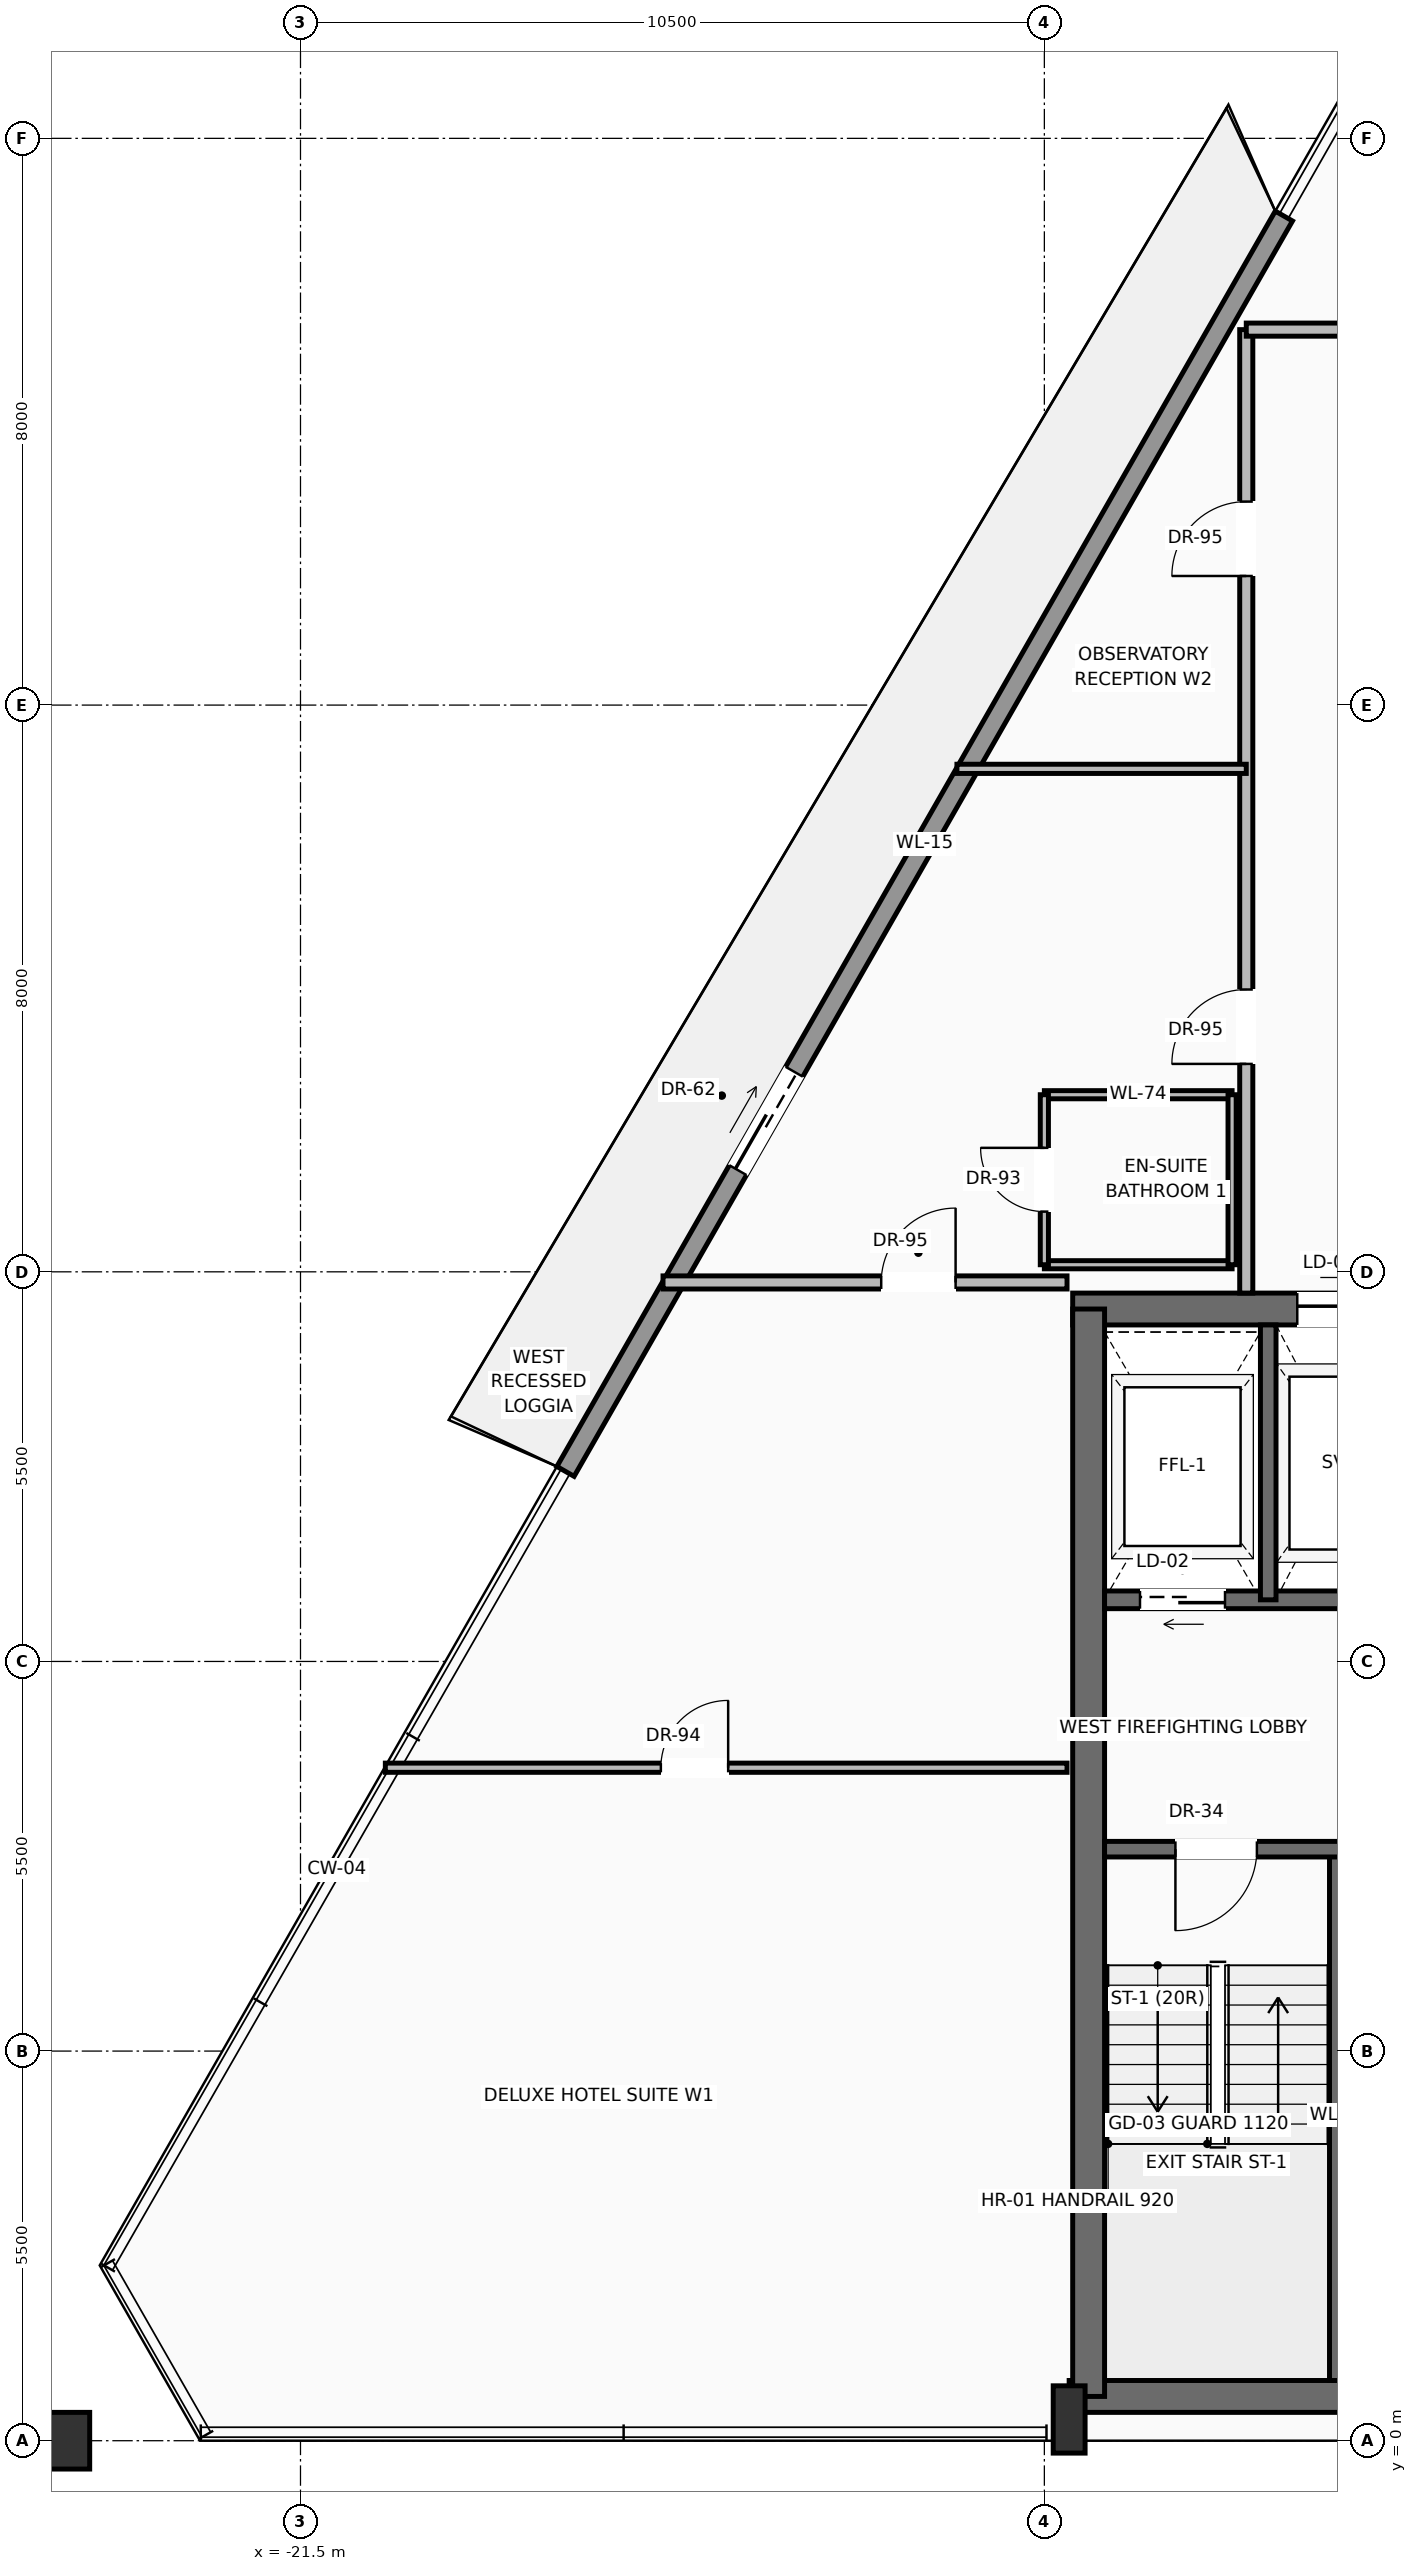
"""IFC4 building model, lengths in metres.
Left out: names, types, materials, properties, quantities, classifications, styles, units other than length and angle.
Written with IfcOpenShell. Run it as: python <this file> out.ifc"""

import sys

from ifc_helpers import new_model, si_unit, direction, frame, frame_2d, origin, origin_2d, place, context, subcontext, project, spatial, rectangle, hollow_rectangle, extrude, source, transform, mapped, element, fill, save


model = new_model("IFC4")
c1 = context("Model", 3, precision=1e-05, world=origin(), true_north=direction((0.0, 1.0)))
c2 = subcontext(c1, "Body", "Model", "MODEL_VIEW")
j1 = project(units=[si_unit("LENGTHUNIT", "METRE"), si_unit("PLANEANGLEUNIT", "RADIAN")], contexts=[c1])
p1 = place(None, origin())
s1 = spatial("IfcSite", under=j1, at=p1, CompositionType="ELEMENT")
p2 = place(p1, origin())
s2 = spatial("IfcBuilding", under=s1, at=p2, CompositionType="ELEMENT")
p3 = place(p2, frame((0.0, 0.0, 300.6)))
s3 = spatial("IfcBuildingStorey", under=s2, at=p3, CompositionType="ELEMENT", Elevation=300.6)
p4 = place(p3, frame((-10.65, 0.625, 0.0), z_axis=(0.0, 0.0, 1.0), x_axis=(1.0, 0.0, 0.0)))
e1 = element("IfcWall", 1, at=p4, inside=s3, PredefinedType="SHEAR", context=c2, shape_type="SweptSolid", body=[
    extrude(rectangle(XDim=21.3, YDim=0.45, at=frame_2d((10.65, 0.0))), origin(), (0.0, 0.0, 1.0), 3.15),
])
p5 = place(p3, frame((-10.6, 15.975, 0.0), z_axis=(0.0, 0.0, 1.0), x_axis=(1.0, 0.0, 0.0)))
e2 = element("IfcWall", 2, at=p5, inside=s3, PredefinedType="SHEAR", context=c2, shape_type="SweptSolid", body=[
    extrude(rectangle(XDim=21.2, YDim=0.45, at=frame_2d((10.6, 0.0))), origin(), (0.0, 0.0, 1.0), 3.15),
])
p6 = place(p5, frame((3.17, 0.0, 0.0)))
e3 = element("IfcOpeningElement", 3, at=p6, cuts=e2, PredefinedType="OPENING", context=c2, shape_type="SweptSolid", body=[
    extrude(rectangle(XDim=1.3, YDim=2.3, at=frame_2d((0.65, 1.15))), frame((0.0, 0.235, 0.0), z_axis=(0.0, -1.0, 0.0), x_axis=(1.0, 0.0, 0.0)), (0.0, 0.0, 1.0), 0.47),
])
p7 = place(p5, frame((9.6, 0.0, 0.0)))
e4 = element("IfcOpeningElement", 4, at=p7, cuts=e2, PredefinedType="OPENING", context=c2, shape_type="SweptSolid", body=[
    extrude(rectangle(XDim=2.0, YDim=2.4, at=frame_2d((1.0, 1.2))), frame((0.0, 0.235, 0.0), z_axis=(0.0, -1.0, 0.0), x_axis=(1.0, 0.0, 0.0)), (0.0, 0.0, 1.0), 0.47),
])
p8 = place(p3, frame((-10.375, 0.625, 0.0), z_axis=(0.0, 0.0, 1.0), x_axis=(0.0, 1.0, 0.0)))
e5 = element("IfcWall", 5, at=p8, inside=s3, PredefinedType="SHEAR", context=c2, shape_type="SweptSolid", body=[
    extrude(rectangle(XDim=15.35, YDim=0.45, at=frame_2d((7.675, 0.0))), origin(), (0.0, 0.0, 1.0), 3.15),
])
m1 = source(origin(), c2, "Body", "SweptSolid", [
    extrude(rectangle(XDim=0.45, YDim=0.95, at=origin_2d()), origin(), (0.0, 0.0, 1.0), 3.45),
])
p9 = place(p3, frame((-10.65, 0.3, 0.0), z_axis=(0.0, 0.0, 1.0), x_axis=(1.0, 0.0, 0.0)))
e6 = element("IfcColumn", 6, at=p9, inside=s3, PredefinedType="PILASTER", context=c2, shape_type="MappedRepresentation", body=[
    mapped(m1, transform((0.0, 0.0, 0.0), scale=1.0)),
])
m2 = source(origin(), c2, "Body", "SweptSolid", [
    extrude(hollow_rectangle(XDim=0.8, YDim=0.8, WallThickness=0.04, at=origin_2d()), origin(), (0.0, 0.0, 1.0), 3.441),
])
p10 = place(p3, frame((-24.875, 0.0, 0.004), z_axis=(0.002908820613, 0.0, 0.999995769372), x_axis=(0.0, 1.0, 0.0)))
e7 = element("IfcColumn", 7, at=p10, inside=s3, PredefinedType="COLUMN", context=c2, shape_type="MappedRepresentation", body=[
    mapped(m2, transform((0.0, 0.0, 0.0), scale=1.0)),
])
p11 = place(p3, frame((-17.759, 13.683, 0.0), z_axis=(0.0, 0.0, 1.0), x_axis=(0.496660385715, 0.867944964419, 0.0)))
e8 = element("IfcWall", 8, at=p11, inside=s3, PredefinedType="SOLIDWALL", context=c2, shape_type="SweptSolid", body=[
    extrude(rectangle(XDim=20.417, YDim=0.28, at=frame_2d((10.208, 0.0))), origin(), (0.0, 0.0, 1.0), 2.73),
])
p12 = place(p11, frame((4.9, 0.0, 0.0)))
e9 = element("IfcOpeningElement", 9, at=p12, cuts=e8, PredefinedType="OPENING", context=c2, shape_type="SweptSolid", body=[
    extrude(rectangle(XDim=1.6, YDim=2.35, at=frame_2d((0.8, 1.175))), frame((0.0, 0.15, 0.0), z_axis=(0.0, -1.0, 0.0), x_axis=(1.0, 0.0, 0.0)), (0.0, 0.0, 1.0), 0.3),
])
p13 = place(p3, frame((-6.85, 0.85, 0.0), z_axis=(0.0, 0.0, 1.0), x_axis=(0.0, 1.0, 0.0)))
e10 = element("IfcWall", 10, at=p13, inside=s3, PredefinedType="SOLIDWALL", context=c2, shape_type="SweptSolid", body=[
    extrude(rectangle(XDim=7.5, YDim=0.25, at=frame_2d((3.75, 0.0))), origin(), (0.0, 0.0, 1.0), 3.15),
])
p14 = place(p3, frame((-5.5, 8.35, 0.0), z_axis=(0.0, 0.0, 1.0), x_axis=(-1.0, 0.0, 0.0)))
e11 = element("IfcWall", 11, at=p14, inside=s3, PredefinedType="SOLIDWALL", context=c2, shape_type="SweptSolid", body=[
    extrude(rectangle(XDim=4.65, YDim=0.22, at=frame_2d((2.325, 0.0))), origin(), (0.0, 0.0, 1.0), 3.15),
])
p15 = place(p14, frame((2.5, 0.0, 0.0)))
e12 = element("IfcOpeningElement", 12, at=p15, cuts=e11, PredefinedType="OPENING", context=c2, shape_type="SweptSolid", body=[
    extrude(rectangle(XDim=1.15, YDim=2.2, at=frame_2d((0.575, 1.1))), frame((0.0, 0.12, 0.0), z_axis=(0.0, -1.0, 0.0), x_axis=(1.0, 0.0, 0.0)), (0.0, 0.0, 1.0), 0.24),
])
p16 = place(p3, frame((-5.5, 11.87, 0.0), z_axis=(0.0, 0.0, 1.0), x_axis=(-1.0, 0.0, 0.0)))
e13 = element("IfcWall", 13, at=p16, inside=s3, PredefinedType="SOLIDWALL", context=c2, shape_type="SweptSolid", body=[
    extrude(rectangle(XDim=4.65, YDim=0.25, at=frame_2d((2.325, 0.0))), origin(), (0.0, 0.0, 1.0), 3.15),
])
p17 = place(p16, frame((2.95, 0.0, 0.0)))
e14 = element("IfcOpeningElement", 14, at=p17, cuts=e13, PredefinedType="OPENING", context=c2, shape_type="SweptSolid", body=[
    extrude(rectangle(XDim=1.2, YDim=2.25, at=frame_2d((0.6, 1.125))), frame((0.0, 0.135, 0.0), z_axis=(0.0, -1.0, 0.0), x_axis=(1.0, 0.0, 0.0)), (0.0, 0.0, 1.0), 0.27),
])
p18 = place(p3, frame((-7.84, 11.87, 0.0), z_axis=(0.0, 0.0, 1.0), x_axis=(0.0, 1.0, 0.0)))
e15 = element("IfcWall", 15, at=p18, inside=s3, PredefinedType="SOLIDWALL", context=c2, shape_type="SweptSolid", body=[
    extrude(rectangle(XDim=3.88, YDim=0.22, at=frame_2d((1.94, 0.0))), origin(), (0.0, 0.0, 1.0), 3.15),
])
p19 = place(p3, frame((-8.15, 16.2, 0.0), z_axis=(0.0, 0.0, 1.0), x_axis=(0.0, 1.0, 0.0)))
e16 = element("IfcWall", 16, at=p19, inside=s3, PredefinedType="PARTITIONING", context=c2, shape_type="SweptSolid", body=[
    extrude(rectangle(XDim=13.6, YDim=0.185, at=frame_2d((6.8, 0.0))), origin(), (0.0, 0.0, 1.0), 3.142),
])
p20 = place(p19, frame((3.235, 0.0, 0.0)))
e17 = element("IfcOpeningElement", 17, at=p20, cuts=e16, PredefinedType="OPENING", context=c2, shape_type="SweptSolid", body=[
    extrude(rectangle(XDim=1.05, YDim=2.25, at=frame_2d((0.525, 1.125))), frame((0.0, 0.103, 0.0), z_axis=(0.0, -1.0, 0.0), x_axis=(1.0, 0.0, 0.0)), (0.0, 0.0, 1.0), 0.205),
])
p21 = place(p19, frame((10.123, 0.0, 0.0)))
e18 = element("IfcOpeningElement", 18, at=p21, cuts=e16, PredefinedType="OPENING", context=c2, shape_type="SweptSolid", body=[
    extrude(rectangle(XDim=1.05, YDim=2.25, at=frame_2d((0.525, 1.125))), frame((0.0, 0.103, 0.0), z_axis=(0.0, -1.0, 0.0), x_axis=(1.0, 0.0, 0.0)), (0.0, 0.0, 1.0), 0.205),
])
p22 = place(p3, frame((-8.15, 29.8, 0.0), z_axis=(0.0, 0.0, 1.0), x_axis=(1.0, 0.0, 0.0)))
e19 = element("IfcWall", 19, at=p22, inside=s3, PredefinedType="PARTITIONING", context=c2, shape_type="SweptSolid", body=[
    extrude(rectangle(XDim=16.3, YDim=0.185, at=frame_2d((8.15, 0.0))), origin(), (0.0, 0.0, 1.0), 3.142),
])
p23 = place(p22, frame((3.347, 0.0, 0.0)))
e20 = element("IfcOpeningElement", 20, at=p23, cuts=e19, PredefinedType="OPENING", context=c2, shape_type="SweptSolid", body=[
    extrude(rectangle(XDim=1.05, YDim=2.25, at=frame_2d((0.525, 1.125))), frame((0.0, 0.103, 0.0), z_axis=(0.0, -1.0, 0.0), x_axis=(1.0, 0.0, 0.0)), (0.0, 0.0, 1.0), 0.205),
])
p24 = place(p22, frame((7.625, 0.0, 0.0)))
e21 = element("IfcOpeningElement", 21, at=p24, cuts=e19, PredefinedType="OPENING", context=c2, shape_type="SweptSolid", body=[
    extrude(rectangle(XDim=1.05, YDim=2.25, at=frame_2d((0.525, 1.125))), frame((0.0, 0.103, 0.0), z_axis=(0.0, -1.0, 0.0), x_axis=(1.0, 0.0, 0.0)), (0.0, 0.0, 1.0), 0.205),
])
p25 = place(p22, frame((11.903, 0.0, 0.0)))
e22 = element("IfcOpeningElement", 22, at=p25, cuts=e19, PredefinedType="OPENING", context=c2, shape_type="SweptSolid", body=[
    extrude(rectangle(XDim=1.05, YDim=2.25, at=frame_2d((0.525, 1.125))), frame((0.0, 0.103, 0.0), z_axis=(0.0, -1.0, 0.0), x_axis=(1.0, 0.0, 0.0)), (0.0, 0.0, 1.0), 0.205),
])
p26 = place(p3, frame((-16.383, 16.35, 0.0), z_axis=(0.0, 0.0, 1.0), x_axis=(1.0, 0.0, 0.0)))
e23 = element("IfcWall", 23, at=p26, inside=s3, PredefinedType="PARTITIONING", context=c2, shape_type="SweptSolid", body=[
    extrude(rectangle(XDim=5.703, YDim=0.185, at=frame_2d((2.852, 0.0))), origin(), (0.0, 0.0, 1.0), 3.142),
])
p27 = place(p26, frame((3.08, 0.0, 0.0)))
e24 = element("IfcOpeningElement", 24, at=p27, cuts=e23, PredefinedType="OPENING", context=c2, shape_type="SweptSolid", body=[
    extrude(rectangle(XDim=1.05, YDim=2.25, at=frame_2d((0.525, 1.125))), frame((0.0, 0.103, 0.0), z_axis=(0.0, -1.0, 0.0), x_axis=(1.0, 0.0, 0.0)), (0.0, 0.0, 1.0), 0.205),
])
p28 = place(p3, frame((-20.302, 9.5, 0.0), z_axis=(0.0, 0.0, 1.0), x_axis=(1.0, 0.0, 0.0)))
e25 = element("IfcWall", 25, at=p28, inside=s3, PredefinedType="PARTITIONING", context=c2, shape_type="SweptSolid", body=[
    extrude(rectangle(XDim=9.623, YDim=0.13, at=frame_2d((4.811, 0.0))), origin(), (0.0, 0.0, 1.0), 3.142),
])
p29 = place(p28, frame((3.889, 0.0, 0.0)))
e26 = element("IfcOpeningElement", 26, at=p29, cuts=e25, PredefinedType="OPENING", context=c2, shape_type="SweptSolid", body=[
    extrude(rectangle(XDim=0.95, YDim=2.2, at=frame_2d((0.475, 1.1))), frame((0.0, 0.075, 0.0), z_axis=(0.0, -1.0, 0.0), x_axis=(1.0, 0.0, 0.0)), (0.0, 0.0, 1.0), 0.15),
])
for number, where, z_axis, x_axis in (
    (27, (-11.0, 16.6, 0.0), (0.0, 0.0, 1.0), (1.0, 0.0, 0.0)),
    (28, (-11.0, 19.0, 0.0), (0.0, 0.0, 1.0), (1.0, 0.0, 0.0)),
):
    element("IfcWall", number, at=place(p3, frame(where, z_axis=z_axis, x_axis=x_axis)), inside=s3, PredefinedType="PARTITIONING", context=c2, shape_type="SweptSolid", body=[
        extrude(rectangle(XDim=2.65, YDim=0.115, at=frame_2d((1.325, 0.0))), origin(), (0.0, 0.0, 1.0), 3.142),
    ])
p30 = place(p3, frame((-11.0, 16.6, 0.0), z_axis=(0.0, 0.0, 1.0), x_axis=(0.0, 1.0, 0.0)))
e29 = element("IfcWall", 29, at=p30, inside=s3, PredefinedType="PARTITIONING", context=c2, shape_type="SweptSolid", body=[
    extrude(rectangle(XDim=2.4, YDim=0.115, at=frame_2d((1.2, 0.0))), origin(), (0.0, 0.0, 1.0), 3.142),
])
p31 = place(p30, frame((0.75, 0.0, 0.0)))
e30 = element("IfcOpeningElement", 30, at=p31, cuts=e29, PredefinedType="OPENING", context=c2, shape_type="SweptSolid", body=[
    extrude(rectangle(XDim=0.9, YDim=2.15, at=frame_2d((0.45, 1.075))), frame((0.0, 0.067, 0.0), z_axis=(0.0, -1.0, 0.0), x_axis=(1.0, 0.0, 0.0)), (0.0, 0.0, 1.0), 0.135),
])
p32 = place(p3, frame((-8.35, 16.6, 0.0), z_axis=(0.0, 0.0, 1.0), x_axis=(0.0, 1.0, 0.0)))
e31 = element("IfcWall", 31, at=p32, inside=s3, PredefinedType="PARTITIONING", context=c2, shape_type="SweptSolid", body=[
    extrude(rectangle(XDim=2.4, YDim=0.115, at=frame_2d((1.2, 0.0))), origin(), (0.0, 0.0, 1.0), 3.142),
])
p33 = place(p3, frame((-12.234, 23.6, 0.0), z_axis=(0.0, 0.0, 1.0), x_axis=(1.0, 0.0, 0.0)))
e32 = element("IfcWall", 32, at=p33, inside=s3, PredefinedType="PARTITIONING", context=c2, shape_type="SweptSolid", body=[
    extrude(rectangle(XDim=4.084, YDim=0.13, at=frame_2d((2.042, 0.0))), origin(), (0.0, 0.0, 1.0), 3.142),
])
m3 = source(origin(), c2, "Body", "SweptSolid", [
    extrude(rectangle(XDim=1.6, YDim=2.35, at=frame_2d((0.8, 1.175))), frame((0.0, 0.025, 0.0), z_axis=(0.0, -1.0, 0.0), x_axis=(1.0, 0.0, 0.0)), (0.0, 0.0, 1.0), 0.05),
])
p34 = place(p12, origin())
e33 = element("IfcDoor", 33, at=p34, inside=s3, OperationType="SLIDING_TO_LEFT", PredefinedType="DOOR", context=c2, shape_type="MappedRepresentation", body=[
    mapped(m3, transform((0.0, 0.0, 0.0), scale=1.0)),
])
fill(e9, e33)
m4 = source(origin(), c2, "Body", "SweptSolid", [
    extrude(rectangle(XDim=1.15, YDim=2.2, at=frame_2d((0.575, 1.1))), frame((0.0, 0.025, 0.0), z_axis=(0.0, -1.0, 0.0), x_axis=(1.0, 0.0, 0.0)), (0.0, 0.0, 1.0), 0.05),
])
p35 = place(p15, origin())
e34 = element("IfcDoor", 34, at=p35, inside=s3, OperationType="SINGLE_SWING_RIGHT", PredefinedType="DOOR", context=c2, shape_type="MappedRepresentation", body=[
    mapped(m4, transform((0.0, 0.0, 0.0), scale=1.0)),
])
fill(e12, e34)
m5 = source(origin(), c2, "Body", "SweptSolid", [
    extrude(rectangle(XDim=1.2, YDim=2.25, at=frame_2d((0.6, 1.125))), frame((0.0, 0.025, 0.0), z_axis=(0.0, -1.0, 0.0), x_axis=(1.0, 0.0, 0.0)), (0.0, 0.0, 1.0), 0.05),
])
p36 = place(p17, origin())
e35 = element("IfcDoor", 35, at=p36, inside=s3, OperationType="SLIDING_TO_LEFT", PredefinedType="DOOR", context=c2, shape_type="MappedRepresentation", body=[
    mapped(m5, transform((0.0, 0.0, 0.0), scale=1.0)),
])
fill(e14, e35)
m6 = source(origin(), c2, "Body", "SweptSolid", [
    extrude(rectangle(XDim=1.3, YDim=2.3, at=frame_2d((0.65, 1.15))), frame((0.0, 0.025, 0.0), z_axis=(0.0, -1.0, 0.0), x_axis=(1.0, 0.0, 0.0)), (0.0, 0.0, 1.0), 0.05),
])
p37 = place(p6, origin())
e36 = element("IfcDoor", 36, at=p37, inside=s3, OperationType="SLIDING_TO_RIGHT", PredefinedType="DOOR", context=c2, shape_type="MappedRepresentation", body=[
    mapped(m6, transform((0.0, 0.0, 0.0), scale=1.0)),
])
fill(e3, e36)
m7 = source(origin(), c2, "Body", "SweptSolid", [
    extrude(rectangle(XDim=1.05, YDim=2.25, at=frame_2d((0.525, 1.125))), frame((0.0, 0.025, 0.0), z_axis=(0.0, -1.0, 0.0), x_axis=(1.0, 0.0, 0.0)), (0.0, 0.0, 1.0), 0.05),
])
p38 = place(p27, origin())
e37 = element("IfcDoor", 37, at=p38, inside=s3, OperationType="SINGLE_SWING_RIGHT", PredefinedType="DOOR", context=c2, shape_type="MappedRepresentation", body=[
    mapped(m7, transform((0.0, 0.0, 0.0), scale=1.0)),
])
fill(e24, e37)
m8 = source(origin(), c2, "Body", "SweptSolid", [
    extrude(rectangle(XDim=0.95, YDim=2.2, at=frame_2d((0.475, 1.1))), frame((0.0, 0.025, 0.0), z_axis=(0.0, -1.0, 0.0), x_axis=(1.0, 0.0, 0.0)), (0.0, 0.0, 1.0), 0.05),
])
p39 = place(p29, origin())
e38 = element("IfcDoor", 38, at=p39, inside=s3, OperationType="SINGLE_SWING_RIGHT", PredefinedType="DOOR", context=c2, shape_type="MappedRepresentation", body=[
    mapped(m8, transform((0.0, 0.0, 0.0), scale=1.0)),
])
fill(e26, e38)
p40 = place(p20, origin())
e39 = element("IfcDoor", 39, at=p40, inside=s3, OperationType="SINGLE_SWING_LEFT", PredefinedType="DOOR", context=c2, shape_type="MappedRepresentation", body=[
    mapped(m7, transform((0.0, 0.0, 0.0), scale=1.0)),
])
fill(e17, e39)
m9 = source(origin(), c2, "Body", "SweptSolid", [
    extrude(rectangle(XDim=0.9, YDim=2.15, at=frame_2d((0.45, 1.075))), frame((0.0, 0.025, 0.0), z_axis=(0.0, -1.0, 0.0), x_axis=(1.0, 0.0, 0.0)), (0.0, 0.0, 1.0), 0.05),
])
p41 = place(p31, origin())
e40 = element("IfcDoor", 40, at=p41, inside=s3, OperationType="SINGLE_SWING_RIGHT", PredefinedType="DOOR", context=c2, shape_type="MappedRepresentation", body=[
    mapped(m9, transform((0.0, 0.0, 0.0), scale=1.0)),
])
fill(e30, e40)
p42 = place(p21, origin())
e41 = element("IfcDoor", 41, at=p42, inside=s3, OperationType="SINGLE_SWING_LEFT", PredefinedType="DOOR", context=c2, shape_type="MappedRepresentation", body=[
    mapped(m7, transform((0.0, 0.0, 0.0), scale=1.0)),
])
fill(e18, e41)
save(model, sys.argv[1])
